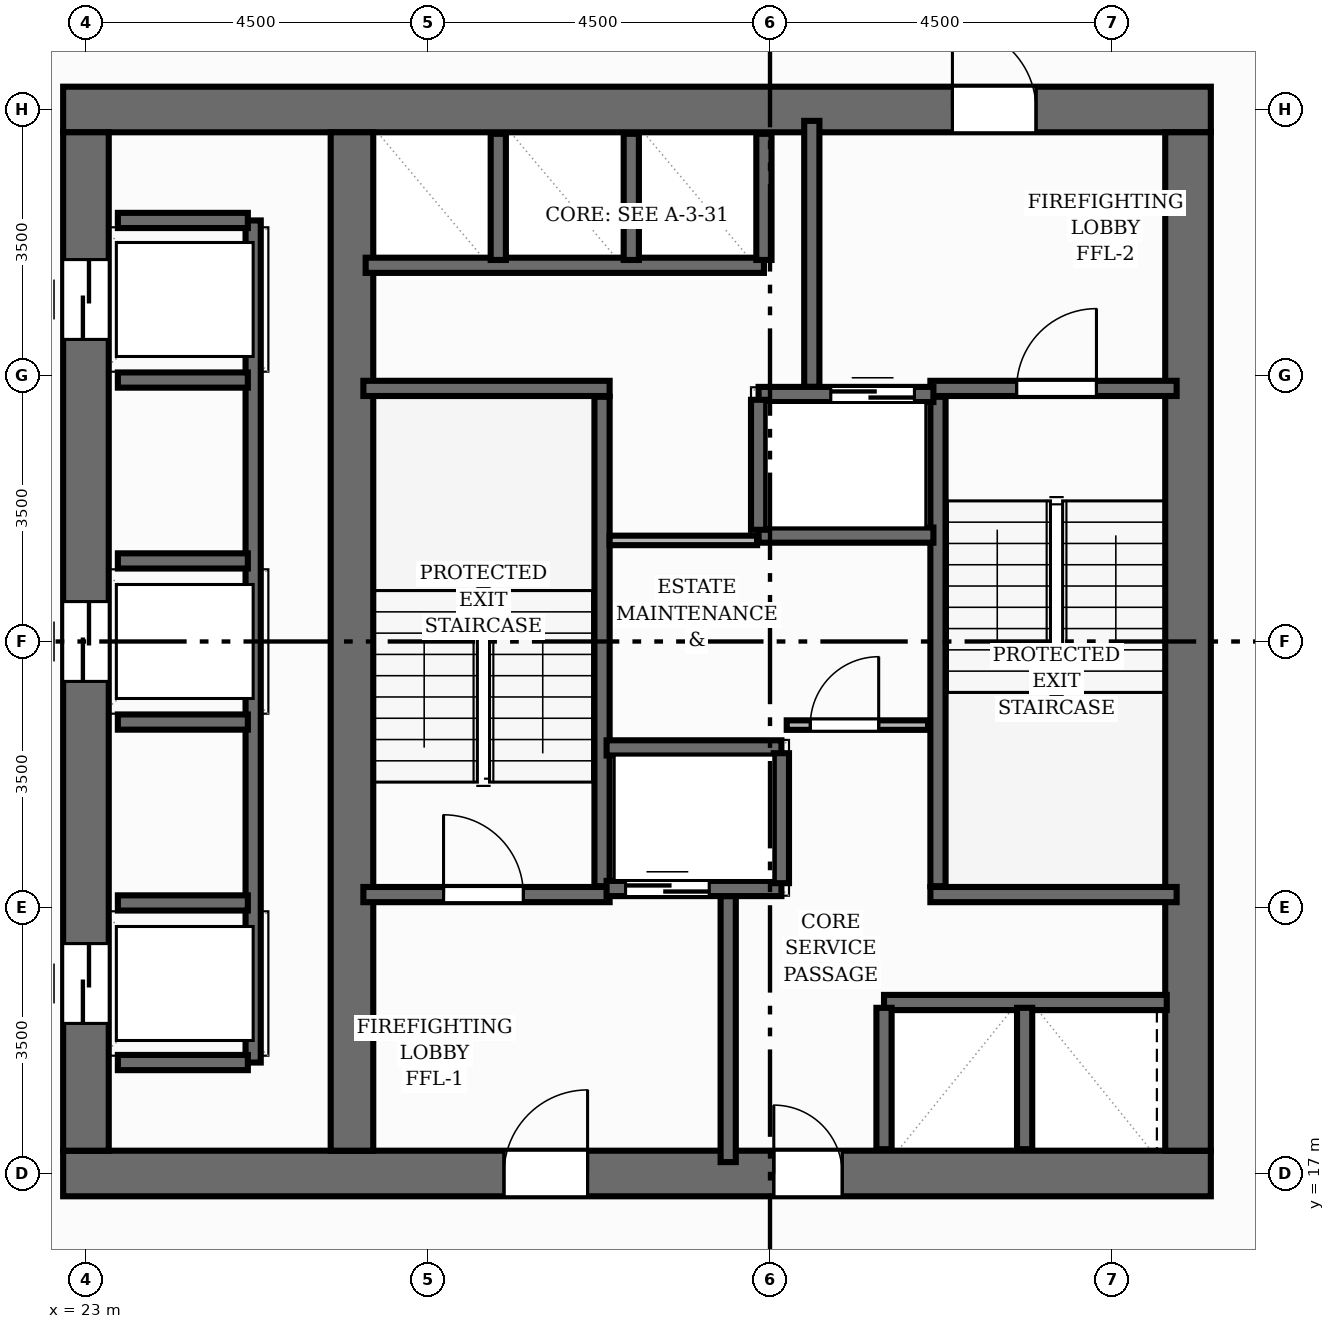
"""IFC4 building model, lengths in metres.
Left out: names, types, materials, properties, quantities, classifications, styles, units other than length and angle.
Written with IfcOpenShell. Run it as: python <this file> out.ifc"""

import sys

from ifc_helpers import new_model, si_unit, direction, frame, frame_2d, origin, place, context, subcontext, project, spatial, rectangle, extrude, element, fill, save


model = new_model("IFC4")
c1 = context("Model", 3, precision=1e-05, world=origin(), true_north=direction((0.0, 1.0)))
c2 = subcontext(c1, "Body", "Model", "MODEL_VIEW")
j1 = project(units=[si_unit("LENGTHUNIT", "METRE"), si_unit("PLANEANGLEUNIT", "RADIAN")], contexts=[c1])
p1 = place(None, origin())
s1 = spatial("IfcSite", under=j1, at=p1, CompositionType="ELEMENT")
p2 = place(p1, origin())
s2 = spatial("IfcBuilding", under=s1, at=p2, CompositionType="ELEMENT")
p3 = place(p2, frame((0.0, 0.0, 123.36)))
s3 = spatial("IfcBuildingStorey", under=s2, at=p3, CompositionType="ELEMENT", Elevation=123.36)
p4 = place(p3, frame((22.7, 17.0, 0.0), z_axis=(0.0, 0.0, 1.0), x_axis=(1.0, 0.0, 0.0)))
e1 = element("IfcWall", 1, at=p4, inside=s3, PredefinedType="SHEAR", context=c2, shape_type="SweptSolid", body=[
    extrude(rectangle(XDim=15.1, YDim=0.6, at=frame_2d((7.55, 0.0))), origin(), (0.0, 0.0, 1.0), 3.2),
])
p5 = place(p4, frame((5.8, 0.0, 0.0)))
e2 = element("IfcOpeningElement", 2, at=p5, cuts=e1, PredefinedType="OPENING", context=c2, shape_type="SweptSolid", body=[
    extrude(rectangle(XDim=1.1, YDim=2.15, at=frame_2d((0.55, 1.075))), frame((0.0, 0.31, 0.0), z_axis=(0.0, -1.0, 0.0), x_axis=(1.0, 0.0, 0.0)), (0.0, 0.0, 1.0), 0.62),
])
p6 = place(p4, frame((9.35, 0.0, 0.0)))
e3 = element("IfcOpeningElement", 3, at=p6, cuts=e1, PredefinedType="OPENING", context=c2, shape_type="SweptSolid", body=[
    extrude(rectangle(XDim=0.9, YDim=2.1, at=frame_2d((0.45, 1.05))), frame((0.0, 0.31, 0.0), z_axis=(0.0, -1.0, 0.0), x_axis=(1.0, 0.0, 0.0)), (0.0, 0.0, 1.0), 0.62),
])
p7 = place(p3, frame((22.7, 31.0, 0.0), z_axis=(0.0, 0.0, 1.0), x_axis=(1.0, 0.0, 0.0)))
e4 = element("IfcWall", 4, at=p7, inside=s3, PredefinedType="SHEAR", context=c2, shape_type="SweptSolid", body=[
    extrude(rectangle(XDim=15.1, YDim=0.6, at=frame_2d((7.55, 0.0))), origin(), (0.0, 0.0, 1.0), 3.2),
])
p8 = place(p7, frame((11.7, 0.0, 0.0)))
e5 = element("IfcOpeningElement", 5, at=p8, cuts=e4, PredefinedType="OPENING", context=c2, shape_type="SweptSolid", body=[
    extrude(rectangle(XDim=1.1, YDim=2.15, at=frame_2d((0.55, 1.075))), frame((0.0, 0.31, 0.0), z_axis=(0.0, -1.0, 0.0), x_axis=(1.0, 0.0, 0.0)), (0.0, 0.0, 1.0), 0.62),
])
p9 = place(p3, frame((23.0, 17.3, 0.0), z_axis=(0.0, 0.0, 1.0), x_axis=(0.0, 1.0, 0.0)))
e6 = element("IfcWall", 6, at=p9, inside=s3, PredefinedType="SHEAR", context=c2, shape_type="SweptSolid", body=[
    extrude(rectangle(XDim=13.4, YDim=0.6, at=frame_2d((6.7, 0.0))), origin(), (0.0, 0.0, 1.0), 3.2),
])
p10 = place(p9, frame((1.675, 0.0, 0.0)))
e7 = element("IfcOpeningElement", 7, at=p10, cuts=e6, PredefinedType="OPENING", context=c2, shape_type="SweptSolid", body=[
    extrude(rectangle(XDim=1.05, YDim=2.15, at=frame_2d((0.525, 1.075))), frame((0.0, 0.31, 0.0), z_axis=(0.0, -1.0, 0.0), x_axis=(1.0, 0.0, 0.0)), (0.0, 0.0, 1.0), 0.62),
])
p11 = place(p9, frame((6.175, 0.0, 0.0)))
e8 = element("IfcOpeningElement", 8, at=p11, cuts=e6, PredefinedType="OPENING", context=c2, shape_type="SweptSolid", body=[
    extrude(rectangle(XDim=1.05, YDim=2.15, at=frame_2d((0.525, 1.075))), frame((0.0, 0.31, 0.0), z_axis=(0.0, -1.0, 0.0), x_axis=(1.0, 0.0, 0.0)), (0.0, 0.0, 1.0), 0.62),
])
p12 = place(p9, frame((10.675, 0.0, 0.0)))
e9 = element("IfcOpeningElement", 9, at=p12, cuts=e6, PredefinedType="OPENING", context=c2, shape_type="SweptSolid", body=[
    extrude(rectangle(XDim=1.05, YDim=2.15, at=frame_2d((0.525, 1.075))), frame((0.0, 0.31, 0.0), z_axis=(0.0, -1.0, 0.0), x_axis=(1.0, 0.0, 0.0)), (0.0, 0.0, 1.0), 0.62),
])
p13 = place(p3, frame((37.5, 17.3, 0.0), z_axis=(0.0, 0.0, 1.0), x_axis=(0.0, 1.0, 0.0)))
e10 = element("IfcWall", 10, at=p13, inside=s3, PredefinedType="SHEAR", context=c2, shape_type="SweptSolid", body=[
    extrude(rectangle(XDim=13.4, YDim=0.6, at=frame_2d((6.7, 0.0))), origin(), (0.0, 0.0, 1.0), 3.2),
])
p14 = place(p3, frame((26.5, 17.3, 0.0), z_axis=(0.0, 0.0, 1.0), x_axis=(0.0, 1.0, 0.0)))
e11 = element("IfcWall", 11, at=p14, inside=s3, PredefinedType="SHEAR", context=c2, shape_type="SweptSolid", body=[
    extrude(rectangle(XDim=13.4, YDim=0.56, at=frame_2d((6.7, 0.0))), origin(), (0.0, 0.0, 1.0), 3.2),
])
p15 = place(p3, frame((29.79, 20.78, 0.0), z_axis=(0.0, 0.0, 1.0), x_axis=(0.0, 1.0, 0.0)))
e12 = element("IfcWall", 12, at=p15, inside=s3, PredefinedType="SHEAR", context=c2, shape_type="SweptSolid", body=[
    extrude(rectangle(XDim=6.44, YDim=0.2, at=frame_2d((3.22, 0.0))), origin(), (0.0, 0.0, 1.0), 3.2),
])
p16 = place(p3, frame((26.65, 27.33, 0.0), z_axis=(0.0, 0.0, 1.0), x_axis=(1.0, 0.0, 0.0)))
e13 = element("IfcWall", 13, at=p16, inside=s3, PredefinedType="SHEAR", context=c2, shape_type="SweptSolid", body=[
    extrude(rectangle(XDim=3.24, YDim=0.2, at=frame_2d((1.62, 0.0))), origin(), (0.0, 0.0, 1.0), 3.2),
])
p17 = place(p3, frame((26.65, 20.67, 0.0), z_axis=(0.0, 0.0, 1.0), x_axis=(1.0, 0.0, 0.0)))
e14 = element("IfcWall", 14, at=p17, inside=s3, PredefinedType="SHEAR", context=c2, shape_type="SweptSolid", body=[
    extrude(rectangle(XDim=3.24, YDim=0.2, at=frame_2d((1.62, 0.0))), origin(), (0.0, 0.0, 1.0), 3.2),
])
p18 = place(p17, frame((1.055, 0.0, 0.0)))
e15 = element("IfcOpeningElement", 15, at=p18, cuts=e14, PredefinedType="OPENING", context=c2, shape_type="SweptSolid", body=[
    extrude(rectangle(XDim=1.05, YDim=2.15, at=frame_2d((0.525, 1.075))), frame((0.0, 0.11, 0.0), z_axis=(0.0, -1.0, 0.0), x_axis=(1.0, 0.0, 0.0)), (0.0, 0.0, 1.0), 0.22),
])
p19 = place(p3, frame((34.21, 20.78, 0.0), z_axis=(0.0, 0.0, 1.0), x_axis=(0.0, 1.0, 0.0)))
e16 = element("IfcWall", 16, at=p19, inside=s3, PredefinedType="SHEAR", context=c2, shape_type="SweptSolid", body=[
    extrude(rectangle(XDim=6.44, YDim=0.2, at=frame_2d((3.22, 0.0))), origin(), (0.0, 0.0, 1.0), 3.2),
])
p20 = place(p3, frame((34.11, 20.67, 0.0), z_axis=(0.0, 0.0, 1.0), x_axis=(1.0, 0.0, 0.0)))
e17 = element("IfcWall", 17, at=p20, inside=s3, PredefinedType="SHEAR", context=c2, shape_type="SweptSolid", body=[
    extrude(rectangle(XDim=3.24, YDim=0.2, at=frame_2d((1.62, 0.0))), origin(), (0.0, 0.0, 1.0), 3.2),
])
p21 = place(p3, frame((34.11, 27.33, 0.0), z_axis=(0.0, 0.0, 1.0), x_axis=(1.0, 0.0, 0.0)))
e18 = element("IfcWall", 18, at=p21, inside=s3, PredefinedType="SHEAR", context=c2, shape_type="SweptSolid", body=[
    extrude(rectangle(XDim=3.24, YDim=0.2, at=frame_2d((1.62, 0.0))), origin(), (0.0, 0.0, 1.0), 3.2),
])
p22 = place(p21, frame((1.135, 0.0, 0.0)))
e19 = element("IfcOpeningElement", 19, at=p22, cuts=e18, PredefinedType="OPENING", context=c2, shape_type="SweptSolid", body=[
    extrude(rectangle(XDim=1.05, YDim=2.15, at=frame_2d((0.525, 1.075))), frame((0.0, 0.11, 0.0), z_axis=(0.0, -1.0, 0.0), x_axis=(1.0, 0.0, 0.0)), (0.0, 0.0, 1.0), 0.22),
])
for number, where, z_axis, x_axis in (
    (20, (31.45, 17.15, 0.0), (0.0, 0.0, 1.0), (0.0, 1.0, 0.0)),
    (21, (32.55, 27.35, 0.0), (0.0, 0.0, 1.0), (0.0, 1.0, 0.0)),
):
    element("IfcWall", number, at=place(p3, frame(where, z_axis=z_axis, x_axis=x_axis)), inside=s3, PredefinedType="SHEAR", context=c2, shape_type="SweptSolid", body=[
        extrude(rectangle(XDim=3.5, YDim=0.2, at=frame_2d((1.75, 0.0))), origin(), (0.0, 0.0, 1.0), 3.2),
    ])
p23 = place(p3, frame((29.85, 20.75, 0.0), z_axis=(0.0, 0.0, 1.0), x_axis=(1.0, 0.0, 0.0)))
e22 = element("IfcWall", 22, at=p23, inside=s3, PredefinedType="SHEAR", context=c2, shape_type="SweptSolid", body=[
    extrude(rectangle(XDim=2.3, YDim=0.2, at=frame_2d((1.15, 0.0))), origin(), (0.0, 0.0, 1.0), 3.2),
])
p24 = place(p23, frame((0.25, 0.0, 0.0)))
e23 = element("IfcOpeningElement", 23, at=p24, cuts=e22, PredefinedType="OPENING", context=c2, shape_type="SweptSolid", body=[
    extrude(rectangle(XDim=1.1, YDim=2.15, at=frame_2d((0.55, 1.075))), frame((0.0, 0.11, 0.0), z_axis=(0.0, -1.0, 0.0), x_axis=(1.0, 0.0, 0.0)), (0.0, 0.0, 1.0), 0.22),
])
p25 = place(p3, frame((29.85, 22.6, 0.0), z_axis=(0.0, 0.0, 1.0), x_axis=(1.0, 0.0, 0.0)))
e24 = element("IfcWall", 24, at=p25, inside=s3, PredefinedType="SHEAR", context=c2, shape_type="SweptSolid", body=[
    extrude(rectangle(XDim=2.3, YDim=0.2, at=frame_2d((1.15, 0.0))), origin(), (0.0, 0.0, 1.0), 3.2),
])
p26 = place(p3, frame((32.15, 20.82, 0.0), z_axis=(0.0, 0.0, 1.0), x_axis=(0.0, 1.0, 0.0)))
e25 = element("IfcWall", 25, at=p26, inside=s3, PredefinedType="SHEAR", context=c2, shape_type="SweptSolid", body=[
    extrude(rectangle(XDim=1.71, YDim=0.2, at=frame_2d((0.855, 0.0))), origin(), (0.0, 0.0, 1.0), 3.2),
])
p27 = place(p3, frame((31.85, 27.25, 0.0), z_axis=(0.0, 0.0, 1.0), x_axis=(1.0, 0.0, 0.0)))
e26 = element("IfcWall", 26, at=p27, inside=s3, PredefinedType="SHEAR", context=c2, shape_type="SweptSolid", body=[
    extrude(rectangle(XDim=2.3, YDim=0.2, at=frame_2d((1.15, 0.0))), origin(), (0.0, 0.0, 1.0), 3.2),
])
p28 = place(p27, frame((0.95, 0.0, 0.0)))
e27 = element("IfcOpeningElement", 27, at=p28, cuts=e26, PredefinedType="OPENING", context=c2, shape_type="SweptSolid", body=[
    extrude(rectangle(XDim=1.1, YDim=2.15, at=frame_2d((0.55, 1.075))), frame((0.0, 0.11, 0.0), z_axis=(0.0, -1.0, 0.0), x_axis=(1.0, 0.0, 0.0)), (0.0, 0.0, 1.0), 0.22),
])
p29 = place(p3, frame((31.85, 25.4, 0.0), z_axis=(0.0, 0.0, 1.0), x_axis=(1.0, 0.0, 0.0)))
e28 = element("IfcWall", 28, at=p29, inside=s3, PredefinedType="SHEAR", context=c2, shape_type="SweptSolid", body=[
    extrude(rectangle(XDim=2.3, YDim=0.2, at=frame_2d((1.15, 0.0))), origin(), (0.0, 0.0, 1.0), 3.2),
])
p30 = place(p3, frame((31.85, 25.47, 0.0), z_axis=(0.0, 0.0, 1.0), x_axis=(0.0, 1.0, 0.0)))
e29 = element("IfcWall", 29, at=p30, inside=s3, PredefinedType="SHEAR", context=c2, shape_type="SweptSolid", body=[
    extrude(rectangle(XDim=1.71, YDim=0.2, at=frame_2d((0.855, 0.0))), origin(), (0.0, 0.0, 1.0), 3.2),
])
p31 = place(p3, frame((25.2, 18.46, 0.0), z_axis=(0.0, 0.0, 1.0), x_axis=(0.0, 1.0, 0.0)))
e30 = element("IfcWall", 30, at=p31, inside=s3, PredefinedType="SHEAR", context=c2, shape_type="SweptSolid", body=[
    extrude(rectangle(XDim=11.08, YDim=0.2, at=frame_2d((5.54, 0.0))), origin(), (0.0, 0.0, 1.0), 3.2),
])
for number, where, z_axis, x_axis in (
    (31, (23.42, 18.46, 0.0), (0.0, 0.0, 1.0), (1.0, 0.0, 0.0)),
    (32, (23.42, 29.54, 0.0), (0.0, 0.0, 1.0), (1.0, 0.0, 0.0)),
    (33, (23.42, 20.56, 0.0), (0.0, 0.0, 1.0), (1.0, 0.0, 0.0)),
    (34, (23.42, 22.94, 0.0), (0.0, 0.0, 1.0), (1.0, 0.0, 0.0)),
    (35, (23.42, 25.06, 0.0), (0.0, 0.0, 1.0), (1.0, 0.0, 0.0)),
    (36, (23.42, 27.44, 0.0), (0.0, 0.0, 1.0), (1.0, 0.0, 0.0)),
):
    element("IfcWall", number, at=place(p3, frame(where, z_axis=z_axis, x_axis=x_axis)), inside=s3, PredefinedType="SHEAR", context=c2, shape_type="SweptSolid", body=[
        extrude(rectangle(XDim=1.71, YDim=0.2, at=frame_2d((0.855, 0.0))), origin(), (0.0, 0.0, 1.0), 3.2),
    ])
p32 = place(p3, frame((26.68, 28.95, 0.0), z_axis=(0.0, 0.0, 1.0), x_axis=(1.0, 0.0, 0.0)))
e37 = element("IfcWall", 37, at=p32, inside=s3, PredefinedType="SHEAR", context=c2, shape_type="SweptSolid", body=[
    extrude(rectangle(XDim=5.24, YDim=0.2, at=frame_2d((2.62, 0.0))), origin(), (0.0, 0.0, 1.0), 3.2),
])
for number, where, z_axis, x_axis in (
    (38, (31.92, 29.02, 0.0), (0.0, 0.0, 1.0), (0.0, 1.0, 0.0)),
    (39, (28.425, 29.02, 0.0), (0.0, 0.0, 1.0), (0.0, 1.0, 0.0)),
    (40, (30.175, 29.02, 0.0), (0.0, 0.0, 1.0), (0.0, 1.0, 0.0)),
):
    element("IfcWall", number, at=place(p3, frame(where, z_axis=z_axis, x_axis=x_axis)), inside=s3, PredefinedType="SHEAR", context=c2, shape_type="SweptSolid", body=[
        extrude(rectangle(XDim=1.66, YDim=0.2, at=frame_2d((0.83, 0.0))), origin(), (0.0, 0.0, 1.0), 3.2),
    ])
p33 = place(p3, frame((33.5, 19.25, 0.0), z_axis=(0.0, 0.0, 1.0), x_axis=(1.0, 0.0, 0.0)))
e41 = element("IfcWall", 41, at=p33, inside=s3, PredefinedType="SHEAR", context=c2, shape_type="SweptSolid", body=[
    extrude(rectangle(XDim=3.72, YDim=0.2, at=frame_2d((1.86, 0.0))), origin(), (0.0, 0.0, 1.0), 3.2),
])
for number, where, z_axis, x_axis in (
    (42, (33.5, 17.32, 0.0), (0.0, 0.0, 1.0), (0.0, 1.0, 0.0)),
    (43, (35.35, 17.32, 0.0), (0.0, 0.0, 1.0), (0.0, 1.0, 0.0)),
):
    element("IfcWall", number, at=place(p3, frame(where, z_axis=z_axis, x_axis=x_axis)), inside=s3, PredefinedType="SHEAR", context=c2, shape_type="SweptSolid", body=[
        extrude(rectangle(XDim=1.86, YDim=0.2, at=frame_2d((0.93, 0.0))), origin(), (0.0, 0.0, 1.0), 3.2),
    ])
p34 = place(p3, frame((32.22, 22.9, 0.0), z_axis=(0.0, 0.0, 1.0), x_axis=(1.0, 0.0, 0.0)))
e44 = element("IfcWall", 44, at=p34, inside=s3, PredefinedType="PARTITIONING", context=c2, shape_type="SweptSolid", body=[
    extrude(rectangle(XDim=1.86, YDim=0.125, at=frame_2d((0.93, 0.0))), origin(), (0.0, 0.0, 1.0), 2.955),
])
p35 = place(p34, frame((0.31, 0.0, 0.0)))
e45 = element("IfcOpeningElement", 45, at=p35, cuts=e44, PredefinedType="OPENING", context=c2, shape_type="SweptSolid", body=[
    extrude(rectangle(XDim=0.9, YDim=2.1, at=frame_2d((0.45, 1.05))), frame((0.0, 0.073, 0.0), z_axis=(0.0, -1.0, 0.0), x_axis=(1.0, 0.0, 0.0)), (0.0, 0.0, 1.0), 0.145),
])
p36 = place(p3, frame((29.89, 25.33, 0.0), z_axis=(0.0, 0.0, 1.0), x_axis=(1.0, 0.0, 0.0)))
e46 = element("IfcWall", 46, at=p36, inside=s3, PredefinedType="PARTITIONING", context=c2, shape_type="SweptSolid", body=[
    extrude(rectangle(XDim=1.94, YDim=0.125, at=frame_2d((0.97, 0.0))), origin(), (0.0, 0.0, 1.0), 2.955),
])
p37 = place(p18, origin())
e47 = element("IfcDoor", 47, at=p37, inside=s3, OperationType="SINGLE_SWING_LEFT", PredefinedType="DOOR", context=c2, shape_type="SweptSolid", body=[
    extrude(rectangle(XDim=1.05, YDim=2.15, at=frame_2d((0.525, 1.075))), frame((0.0, 0.025, 0.0), z_axis=(0.0, -1.0, 0.0), x_axis=(1.0, 0.0, 0.0)), (0.0, 0.0, 1.0), 0.05),
])
fill(e15, e47)
p38 = place(p22, origin())
e48 = element("IfcDoor", 48, at=p38, inside=s3, OperationType="SINGLE_SWING_RIGHT", PredefinedType="DOOR", context=c2, shape_type="SweptSolid", body=[
    extrude(rectangle(XDim=1.05, YDim=2.15, at=frame_2d((0.525, 1.075))), frame((0.0, 0.025, 0.0), z_axis=(0.0, -1.0, 0.0), x_axis=(1.0, 0.0, 0.0)), (0.0, 0.0, 1.0), 0.05),
])
fill(e19, e48)
p39 = place(p5, origin())
e49 = element("IfcDoor", 49, at=p39, inside=s3, OperationType="SINGLE_SWING_RIGHT", PredefinedType="DOOR", context=c2, shape_type="SweptSolid", body=[
    extrude(rectangle(XDim=1.1, YDim=2.15, at=frame_2d((0.55, 1.075))), frame((0.0, 0.025, 0.0), z_axis=(0.0, -1.0, 0.0), x_axis=(1.0, 0.0, 0.0)), (0.0, 0.0, 1.0), 0.05),
])
fill(e2, e49)
p40 = place(p8, origin())
e50 = element("IfcDoor", 50, at=p40, inside=s3, OperationType="SINGLE_SWING_LEFT", PredefinedType="DOOR", context=c2, shape_type="SweptSolid", body=[
    extrude(rectangle(XDim=1.1, YDim=2.15, at=frame_2d((0.55, 1.075))), frame((0.0, 0.025, 0.0), z_axis=(0.0, -1.0, 0.0), x_axis=(1.0, 0.0, 0.0)), (0.0, 0.0, 1.0), 0.05),
])
fill(e5, e50)
p41 = place(p24, origin())
e51 = element("IfcDoor", 51, at=p41, inside=s3, OperationType="DOUBLE_DOOR_SLIDING", PredefinedType="DOOR", context=c2, shape_type="SweptSolid", body=[
    extrude(rectangle(XDim=1.1, YDim=2.15, at=frame_2d((0.55, 1.075))), frame((0.0, 0.025, 0.0), z_axis=(0.0, -1.0, 0.0), x_axis=(1.0, 0.0, 0.0)), (0.0, 0.0, 1.0), 0.05),
])
fill(e23, e51)
p42 = place(p28, origin())
e52 = element("IfcDoor", 52, at=p42, inside=s3, OperationType="DOUBLE_DOOR_SLIDING", PredefinedType="DOOR", context=c2, shape_type="SweptSolid", body=[
    extrude(rectangle(XDim=1.1, YDim=2.15, at=frame_2d((0.55, 1.075))), frame((0.0, 0.025, 0.0), z_axis=(0.0, -1.0, 0.0), x_axis=(1.0, 0.0, 0.0)), (0.0, 0.0, 1.0), 0.05),
])
fill(e27, e52)
p43 = place(p10, origin())
e53 = element("IfcDoor", 53, at=p43, inside=s3, OperationType="DOUBLE_DOOR_SLIDING", PredefinedType="DOOR", context=c2, shape_type="SweptSolid", body=[
    extrude(rectangle(XDim=1.05, YDim=2.15, at=frame_2d((0.525, 1.075))), frame((0.0, 0.025, 0.0), z_axis=(0.0, -1.0, 0.0), x_axis=(1.0, 0.0, 0.0)), (0.0, 0.0, 1.0), 0.05),
])
fill(e7, e53)
p44 = place(p11, origin())
e54 = element("IfcDoor", 54, at=p44, inside=s3, OperationType="DOUBLE_DOOR_SLIDING", PredefinedType="DOOR", context=c2, shape_type="SweptSolid", body=[
    extrude(rectangle(XDim=1.05, YDim=2.15, at=frame_2d((0.525, 1.075))), frame((0.0, 0.025, 0.0), z_axis=(0.0, -1.0, 0.0), x_axis=(1.0, 0.0, 0.0)), (0.0, 0.0, 1.0), 0.05),
])
fill(e8, e54)
p45 = place(p12, origin())
e55 = element("IfcDoor", 55, at=p45, inside=s3, OperationType="DOUBLE_DOOR_SLIDING", PredefinedType="DOOR", context=c2, shape_type="SweptSolid", body=[
    extrude(rectangle(XDim=1.05, YDim=2.15, at=frame_2d((0.525, 1.075))), frame((0.0, 0.025, 0.0), z_axis=(0.0, -1.0, 0.0), x_axis=(1.0, 0.0, 0.0)), (0.0, 0.0, 1.0), 0.05),
])
fill(e9, e55)
p46 = place(p6, origin())
e56 = element("IfcDoor", 56, at=p46, inside=s3, OperationType="SINGLE_SWING_LEFT", PredefinedType="DOOR", context=c2, shape_type="SweptSolid", body=[
    extrude(rectangle(XDim=0.9, YDim=2.1, at=frame_2d((0.45, 1.05))), frame((0.0, 0.025, 0.0), z_axis=(0.0, -1.0, 0.0), x_axis=(1.0, 0.0, 0.0)), (0.0, 0.0, 1.0), 0.05),
])
fill(e3, e56)
p47 = place(p35, origin())
e57 = element("IfcDoor", 57, at=p47, inside=s3, OperationType="SINGLE_SWING_RIGHT", PredefinedType="DOOR", context=c2, shape_type="SweptSolid", body=[
    extrude(rectangle(XDim=0.9, YDim=2.1, at=frame_2d((0.45, 1.05))), frame((0.0, 0.025, 0.0), z_axis=(0.0, -1.0, 0.0), x_axis=(1.0, 0.0, 0.0)), (0.0, 0.0, 1.0), 0.05),
])
fill(e45, e57)
save(model, sys.argv[1])
